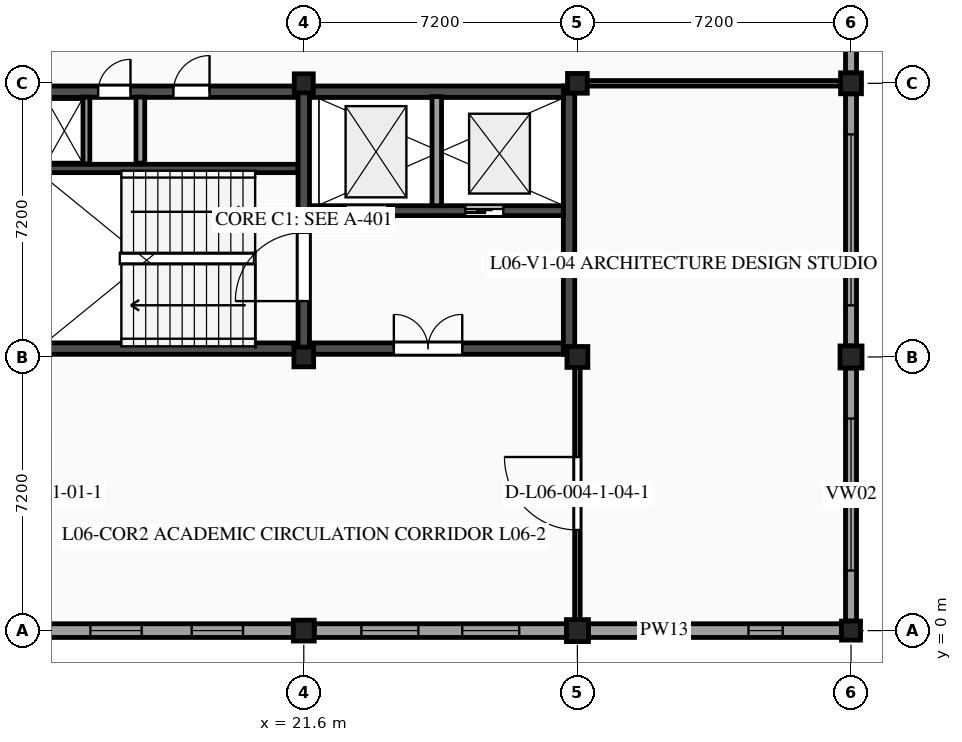
"""IFC4 building model, lengths in metres.
Left out: names, types, materials, properties, quantities, classifications, styles, units other than length and angle.
Written with IfcOpenShell. Run it as: python <this file> out.ifc"""

import sys

from ifc_helpers import new_model, si_unit, direction, frame, frame_2d, origin, origin_2d, place, context, subcontext, project, spatial, rectangle, extrude, element, fill, save


model = new_model("IFC4")
c1 = context("Model", 3, precision=1e-05, world=origin(), true_north=direction((0.0, 1.0)))
c2 = subcontext(c1, "Body", "Model", "MODEL_VIEW")
j1 = project(units=[si_unit("LENGTHUNIT", "METRE"), si_unit("PLANEANGLEUNIT", "RADIAN")], contexts=[c1])
p1 = place(None, origin())
s1 = spatial("IfcSite", under=j1, at=p1, CompositionType="ELEMENT")
p2 = place(p1, origin())
s2 = spatial("IfcBuilding", under=s1, at=p2, CompositionType="ELEMENT")
p3 = place(p2, frame((0.0, 0.0, 26.7)))
s3 = spatial("IfcBuildingStorey", under=s2, at=p3, CompositionType="ELEMENT", Elevation=26.7)
p4 = place(p3, frame((21.6, 0.0, 0.0), z_axis=(0.0, 0.0, 1.0), x_axis=(1.0, 0.0, 0.0)))
e1 = element("IfcColumn", 1, at=p4, inside=s3, PredefinedType="COLUMN", context=c2, shape_type="SweptSolid", body=[
    extrude(rectangle(XDim=0.55, YDim=0.55, at=origin_2d()), origin(), (0.0, 0.0, 1.0), 3.9),
])
p5 = place(p3, frame((21.6, 7.2, 0.0), z_axis=(0.0, 0.0, 1.0), x_axis=(1.0, 0.0, 0.0)))
e2 = element("IfcColumn", 2, at=p5, inside=s3, PredefinedType="COLUMN", context=c2, shape_type="SweptSolid", body=[
    extrude(rectangle(XDim=0.52, YDim=0.52, at=origin_2d()), origin(), (0.0, 0.0, 1.0), 3.9),
])
p6 = place(p3, frame((21.6, 14.4, 0.0), z_axis=(0.0, 0.0, 1.0), x_axis=(1.0, 0.0, 0.0)))
e3 = element("IfcColumn", 3, at=p6, inside=s3, PredefinedType="COLUMN", context=c2, shape_type="SweptSolid", body=[
    extrude(rectangle(XDim=0.5, YDim=0.5, at=origin_2d()), origin(), (0.0, 0.0, 1.0), 3.9),
])
p7 = place(p3, frame((28.8, 0.0, 0.0), z_axis=(0.0, 0.0, 1.0), x_axis=(1.0, 0.0, 0.0)))
e4 = element("IfcColumn", 4, at=p7, inside=s3, PredefinedType="COLUMN", context=c2, shape_type="SweptSolid", body=[
    extrude(rectangle(XDim=0.58, YDim=0.58, at=origin_2d()), origin(), (0.0, 0.0, 1.0), 3.9),
])
p8 = place(p3, frame((28.8, 7.2, 0.0), z_axis=(0.0, 0.0, 1.0), x_axis=(1.0, 0.0, 0.0)))
e5 = element("IfcColumn", 5, at=p8, inside=s3, PredefinedType="COLUMN", context=c2, shape_type="SweptSolid", body=[
    extrude(rectangle(XDim=0.55, YDim=0.55, at=origin_2d()), origin(), (0.0, 0.0, 1.0), 3.9),
])
p9 = place(p3, frame((28.8, 14.4, 0.0), z_axis=(0.0, 0.0, 1.0), x_axis=(1.0, 0.0, 0.0)))
e6 = element("IfcColumn", 6, at=p9, inside=s3, PredefinedType="COLUMN", context=c2, shape_type="SweptSolid", body=[
    extrude(rectangle(XDim=0.52, YDim=0.52, at=origin_2d()), origin(), (0.0, 0.0, 1.0), 3.9),
])
p10 = place(p3, frame((36.0, 0.0, 0.0), z_axis=(0.0, 0.0, 1.0), x_axis=(1.0, 0.0, 0.0)))
e7 = element("IfcColumn", 7, at=p10, inside=s3, PredefinedType="COLUMN", context=c2, shape_type="SweptSolid", body=[
    extrude(rectangle(XDim=0.5, YDim=0.5, at=origin_2d()), origin(), (0.0, 0.0, 1.0), 3.9),
])
p11 = place(p3, frame((36.0, 7.2, 0.0), z_axis=(0.0, 0.0, 1.0), x_axis=(1.0, 0.0, 0.0)))
e8 = element("IfcColumn", 8, at=p11, inside=s3, PredefinedType="COLUMN", context=c2, shape_type="SweptSolid", body=[
    extrude(rectangle(XDim=0.58, YDim=0.58, at=origin_2d()), origin(), (0.0, 0.0, 1.0), 3.9),
])
p12 = place(p3, frame((36.0, 14.4, 0.0), z_axis=(0.0, 0.0, 1.0), x_axis=(1.0, 0.0, 0.0)))
e9 = element("IfcColumn", 9, at=p12, inside=s3, PredefinedType="COLUMN", context=c2, shape_type="SweptSolid", body=[
    extrude(rectangle(XDim=0.55, YDim=0.55, at=origin_2d()), origin(), (0.0, 0.0, 1.0), 3.9),
])
p13 = place(p3, frame((36.0, 21.34, 0.0), z_axis=(0.0, 0.0, 1.0), x_axis=(0.0, -1.0, 0.0)))
e10 = element("IfcWall", 10, at=p13, inside=s3, PredefinedType="STANDARD", context=c2, shape_type="SweptSolid", body=[
    extrude(rectangle(XDim=6.665, YDim=0.29, at=frame_2d((3.333, 0.0))), origin(), (0.0, 0.0, 1.0), 2.83),
])
p14 = place(p13, frame((1.532, 0.0, 0.98)))
e11 = element("IfcOpeningElement", 11, at=p14, cuts=e10, PredefinedType="OPENING", context=c2, shape_type="SweptSolid", body=[
    extrude(rectangle(XDim=3.6, YDim=1.8, at=frame_2d((1.8, 0.9))), frame((0.0, 0.155, 0.0), z_axis=(0.0, -1.0, 0.0), x_axis=(1.0, 0.0, 0.0)), (0.0, 0.0, 1.0), 0.31),
])
p15 = place(p3, frame((36.0, 14.125, 0.0), z_axis=(0.0, 0.0, 1.0), x_axis=(0.0, -1.0, 0.0)))
e12 = element("IfcWall", 12, at=p15, inside=s3, PredefinedType="STANDARD", context=c2, shape_type="SweptSolid", body=[
    extrude(rectangle(XDim=6.635, YDim=0.29, at=frame_2d((3.317, 0.0))), origin(), (0.0, 0.0, 1.0), 2.83),
])
p16 = place(p15, frame((1.067, 0.0, 0.98)))
e13 = element("IfcOpeningElement", 13, at=p16, cuts=e12, PredefinedType="OPENING", context=c2, shape_type="SweptSolid", body=[
    extrude(rectangle(XDim=4.5, YDim=1.55, at=frame_2d((2.25, 0.775))), frame((0.0, 0.155, 0.0), z_axis=(0.0, -1.0, 0.0), x_axis=(1.0, 0.0, 0.0)), (0.0, 0.0, 1.0), 0.31),
])
p17 = place(p3, frame((36.0, 6.91, 0.0), z_axis=(0.0, 0.0, 1.0), x_axis=(0.0, -1.0, 0.0)))
e14 = element("IfcWall", 14, at=p17, inside=s3, PredefinedType="STANDARD", context=c2, shape_type="SweptSolid", body=[
    extrude(rectangle(XDim=6.66, YDim=0.29, at=frame_2d((3.33, 0.0))), origin(), (0.0, 0.0, 1.0), 2.83),
])
p18 = place(p17, frame((1.33, 0.0, 0.98)))
e15 = element("IfcOpeningElement", 15, at=p18, cuts=e14, PredefinedType="OPENING", context=c2, shape_type="SweptSolid", body=[
    extrude(rectangle(XDim=4.0, YDim=1.55, at=frame_2d((2.0, 0.775))), frame((0.0, 0.155, 0.0), z_axis=(0.0, -1.0, 0.0), x_axis=(1.0, 0.0, 0.0)), (0.0, 0.0, 1.0), 0.31),
])
p19 = place(p3, frame((35.75, 0.0, 0.0), z_axis=(0.0, 0.0, 1.0), x_axis=(-1.0, 0.0, 0.0)))
e16 = element("IfcWall", 16, at=p19, inside=s3, PredefinedType="STANDARD", context=c2, shape_type="SweptSolid", body=[
    extrude(rectangle(XDim=6.66, YDim=0.36, at=frame_2d((3.33, 0.0))), origin(), (0.0, 0.0, 1.0), 2.83),
])
p20 = place(p19, frame((1.548, 0.0, 1.15)))
e17 = element("IfcOpeningElement", 17, at=p20, cuts=e16, PredefinedType="OPENING", context=c2, shape_type="SweptSolid", body=[
    extrude(rectangle(XDim=0.9, YDim=1.3, at=frame_2d((0.45, 0.65))), frame((0.0, 0.19, 0.0), z_axis=(0.0, -1.0, 0.0), x_axis=(1.0, 0.0, 0.0)), (0.0, 0.0, 1.0), 0.38),
])
p21 = place(p19, frame((4.212, 0.0, 1.15)))
e18 = element("IfcOpeningElement", 18, at=p21, cuts=e16, PredefinedType="OPENING", context=c2, shape_type="SweptSolid", body=[
    extrude(rectangle(XDim=0.9, YDim=1.3, at=frame_2d((0.45, 0.65))), frame((0.0, 0.19, 0.0), z_axis=(0.0, -1.0, 0.0), x_axis=(1.0, 0.0, 0.0)), (0.0, 0.0, 1.0), 0.38),
])
p22 = place(p3, frame((28.51, 0.0, 0.0), z_axis=(0.0, 0.0, 1.0), x_axis=(-1.0, 0.0, 0.0)))
e19 = element("IfcWall", 19, at=p22, inside=s3, PredefinedType="STANDARD", context=c2, shape_type="SweptSolid", body=[
    extrude(rectangle(XDim=6.635, YDim=0.36, at=frame_2d((3.317, 0.0))), origin(), (0.0, 0.0, 1.0), 2.865),
])
p23 = place(p22, frame((1.24, 0.0, 1.15)))
e20 = element("IfcOpeningElement", 20, at=p23, cuts=e19, PredefinedType="OPENING", context=c2, shape_type="SweptSolid", body=[
    extrude(rectangle(XDim=1.5, YDim=1.2, at=frame_2d((0.75, 0.6))), frame((0.0, 0.19, 0.0), z_axis=(0.0, -1.0, 0.0), x_axis=(1.0, 0.0, 0.0)), (0.0, 0.0, 1.0), 0.38),
])
p24 = place(p22, frame((3.895, 0.0, 1.15)))
e21 = element("IfcOpeningElement", 21, at=p24, cuts=e19, PredefinedType="OPENING", context=c2, shape_type="SweptSolid", body=[
    extrude(rectangle(XDim=1.5, YDim=1.2, at=frame_2d((0.75, 0.6))), frame((0.0, 0.19, 0.0), z_axis=(0.0, -1.0, 0.0), x_axis=(1.0, 0.0, 0.0)), (0.0, 0.0, 1.0), 0.38),
])
p25 = place(p3, frame((21.325, 0.0, 0.0), z_axis=(0.0, 0.0, 1.0), x_axis=(-1.0, 0.0, 0.0)))
e22 = element("IfcWall", 22, at=p25, inside=s3, PredefinedType="STANDARD", context=c2, shape_type="SweptSolid", body=[
    extrude(rectangle(XDim=6.665, YDim=0.36, at=frame_2d((3.333, 0.0))), origin(), (0.0, 0.0, 1.0), 2.865),
])
p26 = place(p25, frame((1.324, 0.0, 1.15)))
e23 = element("IfcOpeningElement", 23, at=p26, cuts=e22, PredefinedType="OPENING", context=c2, shape_type="SweptSolid", body=[
    extrude(rectangle(XDim=1.35, YDim=1.1, at=frame_2d((0.675, 0.55))), frame((0.0, 0.19, 0.0), z_axis=(0.0, -1.0, 0.0), x_axis=(1.0, 0.0, 0.0)), (0.0, 0.0, 1.0), 0.38),
])
p27 = place(p25, frame((3.99, 0.0, 1.15)))
e24 = element("IfcOpeningElement", 24, at=p27, cuts=e22, PredefinedType="OPENING", context=c2, shape_type="SweptSolid", body=[
    extrude(rectangle(XDim=1.35, YDim=1.1, at=frame_2d((0.675, 0.55))), frame((0.0, 0.19, 0.0), z_axis=(0.0, -1.0, 0.0), x_axis=(1.0, 0.0, 0.0)), (0.0, 0.0, 1.0), 0.38),
])
p28 = place(p3, frame((14.77, 7.42, 0.0), z_axis=(0.0, 0.0, 1.0), x_axis=(1.0, 0.0, 0.0)))
e25 = element("IfcWall", 25, at=p28, inside=s3, PredefinedType="SHEAR", context=c2, shape_type="SweptSolid", body=[
    extrude(rectangle(XDim=6.68, YDim=0.3, at=frame_2d((3.34, 0.0))), origin(), (0.0, 0.0, 1.0), 3.67),
])
p29 = place(p3, frame((14.77, 14.18, 0.0), z_axis=(0.0, 0.0, 1.0), x_axis=(1.0, 0.0, 0.0)))
e26 = element("IfcWall", 26, at=p29, inside=s3, PredefinedType="SHEAR", context=c2, shape_type="SweptSolid", body=[
    extrude(rectangle(XDim=6.68, YDim=0.3, at=frame_2d((3.34, 0.0))), origin(), (0.0, 0.0, 1.0), 3.67),
])
p30 = place(p29, frame((1.42, 0.0, 0.0)))
e27 = element("IfcOpeningElement", 27, at=p30, cuts=e26, PredefinedType="OPENING", context=c2, shape_type="SweptSolid", body=[
    extrude(rectangle(XDim=0.85, YDim=2.1, at=frame_2d((0.425, 1.05))), frame((0.0, 0.16, 0.0), z_axis=(0.0, -1.0, 0.0), x_axis=(1.0, 0.0, 0.0)), (0.0, 0.0, 1.0), 0.32),
])
p31 = place(p29, frame((3.4, 0.0, 0.0)))
e28 = element("IfcOpeningElement", 28, at=p31, cuts=e26, PredefinedType="OPENING", context=c2, shape_type="SweptSolid", body=[
    extrude(rectangle(XDim=0.95, YDim=2.15, at=frame_2d((0.475, 1.075))), frame((0.0, 0.16, 0.0), z_axis=(0.0, -1.0, 0.0), x_axis=(1.0, 0.0, 0.0)), (0.0, 0.0, 1.0), 0.32),
])
p32 = place(p3, frame((14.77, 12.16, 0.0), z_axis=(0.0, 0.0, 1.0), x_axis=(1.0, 0.0, 0.0)))
e29 = element("IfcWall", 29, at=p32, inside=s3, PredefinedType="SHEAR", context=c2, shape_type="SweptSolid", body=[
    extrude(rectangle(XDim=6.68, YDim=0.22, at=frame_2d((3.34, 0.0))), origin(), (0.0, 0.0, 1.0), 3.67),
])
p33 = place(p3, frame((17.3, 12.3, 0.0), z_axis=(0.0, 0.0, 1.0), x_axis=(0.0, 1.0, 0.0)))
e30 = element("IfcWall", 30, at=p33, inside=s3, PredefinedType="PARTITIONING", context=c2, shape_type="SweptSolid", body=[
    extrude(rectangle(XDim=1.74, YDim=0.23, at=frame_2d((0.87, 0.0))), origin(), (0.0, 0.0, 1.0), 3.67),
])
p34 = place(p3, frame((15.88, 12.28, 0.0), z_axis=(0.0, 0.0, 1.0), x_axis=(0.0, 1.0, 0.0)))
e31 = element("IfcWall", 31, at=p34, inside=s3, PredefinedType="PARTITIONING", context=c2, shape_type="SweptSolid", body=[
    extrude(rectangle(XDim=1.76, YDim=0.18, at=frame_2d((0.88, 0.0))), origin(), (0.0, 0.0, 1.0), 3.67),
])
p35 = place(p3, frame((21.6, 7.27, 0.0), z_axis=(0.0, 0.0, 1.0), x_axis=(0.0, 1.0, 0.0)))
e32 = element("IfcWall", 32, at=p35, inside=s3, PredefinedType="SHEAR", context=c2, shape_type="SweptSolid", body=[
    extrude(rectangle(XDim=7.06, YDim=0.3, at=frame_2d((3.53, 0.0))), origin(), (0.0, 0.0, 1.0), 3.67),
])
p36 = place(p35, frame((1.4, 0.0, 0.0)))
e33 = element("IfcOpeningElement", 33, at=p36, cuts=e32, PredefinedType="OPENING", context=c2, shape_type="SweptSolid", body=[
    extrude(rectangle(XDim=1.8, YDim=2.2, at=frame_2d((0.9, 1.1))), frame((0.0, 0.16, 0.0), z_axis=(0.0, -1.0, 0.0), x_axis=(1.0, 0.0, 0.0)), (0.0, 0.0, 1.0), 0.32),
])
p37 = place(p3, frame((21.75, 7.42, 0.0), z_axis=(0.0, 0.0, 1.0), x_axis=(1.0, 0.0, 0.0)))
e34 = element("IfcWall", 34, at=p37, inside=s3, PredefinedType="SHEAR", context=c2, shape_type="SweptSolid", body=[
    extrude(rectangle(XDim=6.68, YDim=0.3, at=frame_2d((3.34, 0.0))), origin(), (0.0, 0.0, 1.0), 3.67),
])
p38 = place(p37, frame((2.22, 0.0, 0.0)))
e35 = element("IfcOpeningElement", 35, at=p38, cuts=e34, PredefinedType="OPENING", context=c2, shape_type="SweptSolid", body=[
    extrude(rectangle(XDim=1.8, YDim=2.2, at=frame_2d((0.9, 1.1))), frame((0.0, 0.16, 0.0), z_axis=(0.0, -1.0, 0.0), x_axis=(1.0, 0.0, 0.0)), (0.0, 0.0, 1.0), 0.32),
])
p39 = place(p3, frame((28.58, 7.27, 0.0), z_axis=(0.0, 0.0, 1.0), x_axis=(0.0, 1.0, 0.0)))
e36 = element("IfcWall", 36, at=p39, inside=s3, PredefinedType="SHEAR", context=c2, shape_type="SweptSolid", body=[
    extrude(rectangle(XDim=7.06, YDim=0.3, at=frame_2d((3.53, 0.0))), origin(), (0.0, 0.0, 1.0), 3.67),
])
p40 = place(p3, frame((21.75, 14.18, 0.0), z_axis=(0.0, 0.0, 1.0), x_axis=(1.0, 0.0, 0.0)))
e37 = element("IfcWall", 37, at=p40, inside=s3, PredefinedType="SHEAR", context=c2, shape_type="SweptSolid", body=[
    extrude(rectangle(XDim=6.68, YDim=0.3, at=frame_2d((3.34, 0.0))), origin(), (0.0, 0.0, 1.0), 3.67),
])
p41 = place(p3, frame((21.75, 11.05, 0.0), z_axis=(0.0, 0.0, 1.0), x_axis=(1.0, 0.0, 0.0)))
e38 = element("IfcWall", 38, at=p41, inside=s3, PredefinedType="SHEAR", context=c2, shape_type="SweptSolid", body=[
    extrude(rectangle(XDim=6.68, YDim=0.26, at=frame_2d((3.34, 0.0))), origin(), (0.0, 0.0, 1.0), 3.67),
])
p42 = place(p41, frame((0.95, 0.0, 0.0)))
e39 = element("IfcOpeningElement", 39, at=p42, cuts=e38, PredefinedType="OPENING", context=c2, shape_type="SweptSolid", body=[
    extrude(rectangle(XDim=1.1, YDim=2.2, at=frame_2d((0.55, 1.1))), frame((0.0, 0.14, 0.0), z_axis=(0.0, -1.0, 0.0), x_axis=(1.0, 0.0, 0.0)), (0.0, 0.0, 1.0), 0.28),
])
p43 = place(p41, frame((4.1, 0.0, 0.0)))
e40 = element("IfcOpeningElement", 40, at=p43, cuts=e38, PredefinedType="OPENING", context=c2, shape_type="SweptSolid", body=[
    extrude(rectangle(XDim=1.0, YDim=2.15, at=frame_2d((0.5, 1.075))), frame((0.0, 0.14, 0.0), z_axis=(0.0, -1.0, 0.0), x_axis=(1.0, 0.0, 0.0)), (0.0, 0.0, 1.0), 0.28),
])
p44 = place(p3, frame((25.1, 11.18, 0.0), z_axis=(0.0, 0.0, 1.0), x_axis=(0.0, 1.0, 0.0)))
e41 = element("IfcWall", 41, at=p44, inside=s3, PredefinedType="PARTITIONING", context=c2, shape_type="SweptSolid", body=[
    extrude(rectangle(XDim=2.87, YDim=0.25, at=frame_2d((1.435, 0.0))), origin(), (0.0, 0.0, 1.0), 3.67),
])
p45 = place(p3, frame((28.8, 0.295, 0.0), z_axis=(0.0, 0.0, 1.0), x_axis=(0.0, 1.0, 0.0)))
e42 = element("IfcWall", 42, at=p45, inside=s3, PredefinedType="PARTITIONING", context=c2, shape_type="SweptSolid", body=[
    extrude(rectangle(XDim=6.625, YDim=0.145, at=frame_2d((3.312, 0.0))), origin(), (0.0, 0.0, 1.0), 3.005),
])
p46 = place(p45, frame((2.353, 0.0, 0.0)))
e43 = element("IfcOpeningElement", 43, at=p46, cuts=e42, PredefinedType="OPENING", context=c2, shape_type="SweptSolid", body=[
    extrude(rectangle(XDim=1.92, YDim=2.35, at=frame_2d((0.96, 1.175))), frame((0.0, 0.083, 0.0), z_axis=(0.0, -1.0, 0.0), x_axis=(1.0, 0.0, 0.0)), (0.0, 0.0, 1.0), 0.165),
])
p47 = place(p3, frame((29.065, 14.4, 0.0), z_axis=(0.0, 0.0, 1.0), x_axis=(1.0, 0.0, 0.0)))
e44 = element("IfcWall", 44, at=p47, inside=s3, PredefinedType="PARTITIONING", context=c2, shape_type="SweptSolid", body=[
    extrude(rectangle(XDim=6.655, YDim=0.145, at=frame_2d((3.328, 0.0))), origin(), (0.0, 0.0, 1.0), 2.855),
])
p48 = place(p16, origin())
e45 = element("IfcWindow", 45, at=p48, inside=s3, PartitioningType="SINGLE_PANEL", PredefinedType="WINDOW", context=c2, shape_type="SweptSolid", body=[
    extrude(rectangle(XDim=4.5, YDim=1.55, at=frame_2d((2.25, 0.775))), frame((0.0, -0.03, 0.0), z_axis=(0.0, -1.0, 0.0), x_axis=(1.0, 0.0, 0.0)), (0.0, 0.0, 1.0), 0.06),
])
fill(e13, e45)
p49 = place(p18, origin())
e46 = element("IfcWindow", 46, at=p49, inside=s3, PartitioningType="SINGLE_PANEL", PredefinedType="WINDOW", context=c2, shape_type="SweptSolid", body=[
    extrude(rectangle(XDim=4.0, YDim=1.55, at=frame_2d((2.0, 0.775))), frame((0.0, -0.03, 0.0), z_axis=(0.0, -1.0, 0.0), x_axis=(1.0, 0.0, 0.0)), (0.0, 0.0, 1.0), 0.06),
])
fill(e15, e46)
p50 = place(p20, origin())
e47 = element("IfcWindow", 47, at=p50, inside=s3, PartitioningType="SINGLE_PANEL", PredefinedType="WINDOW", context=c2, shape_type="SweptSolid", body=[
    extrude(rectangle(XDim=0.9, YDim=1.3, at=frame_2d((0.45, 0.65))), frame((0.0, -0.08, 0.0), z_axis=(0.0, -1.0, 0.0), x_axis=(1.0, 0.0, 0.0)), (0.0, 0.0, 1.0), 0.06),
])
fill(e17, e47)
p51 = place(p21, origin())
e48 = element("IfcWindow", 48, at=p51, inside=s3, PartitioningType="SINGLE_PANEL", PredefinedType="WINDOW", context=c2, shape_type="SweptSolid", body=[
    extrude(rectangle(XDim=0.9, YDim=1.3, at=frame_2d((0.45, 0.65))), frame((0.0, -0.08, 0.0), z_axis=(0.0, -1.0, 0.0), x_axis=(1.0, 0.0, 0.0)), (0.0, 0.0, 1.0), 0.06),
])
fill(e18, e48)
p52 = place(p23, origin())
e49 = element("IfcWindow", 49, at=p52, inside=s3, PartitioningType="SINGLE_PANEL", PredefinedType="WINDOW", context=c2, shape_type="SweptSolid", body=[
    extrude(rectangle(XDim=1.5, YDim=1.2, at=frame_2d((0.75, 0.6))), frame((0.0, -0.08, 0.0), z_axis=(0.0, -1.0, 0.0), x_axis=(1.0, 0.0, 0.0)), (0.0, 0.0, 1.0), 0.06),
])
fill(e20, e49)
p53 = place(p24, origin())
e50 = element("IfcWindow", 50, at=p53, inside=s3, PartitioningType="SINGLE_PANEL", PredefinedType="WINDOW", context=c2, shape_type="SweptSolid", body=[
    extrude(rectangle(XDim=1.5, YDim=1.2, at=frame_2d((0.75, 0.6))), frame((0.0, -0.08, 0.0), z_axis=(0.0, -1.0, 0.0), x_axis=(1.0, 0.0, 0.0)), (0.0, 0.0, 1.0), 0.06),
])
fill(e21, e50)
p54 = place(p26, origin())
e51 = element("IfcWindow", 51, at=p54, inside=s3, PartitioningType="SINGLE_PANEL", PredefinedType="WINDOW", context=c2, shape_type="SweptSolid", body=[
    extrude(rectangle(XDim=1.35, YDim=1.1, at=frame_2d((0.675, 0.55))), frame((0.0, -0.08, 0.0), z_axis=(0.0, -1.0, 0.0), x_axis=(1.0, 0.0, 0.0)), (0.0, 0.0, 1.0), 0.06),
])
fill(e23, e51)
p55 = place(p27, origin())
e52 = element("IfcWindow", 52, at=p55, inside=s3, PartitioningType="SINGLE_PANEL", PredefinedType="WINDOW", context=c2, shape_type="SweptSolid", body=[
    extrude(rectangle(XDim=1.35, YDim=1.1, at=frame_2d((0.675, 0.55))), frame((0.0, -0.08, 0.0), z_axis=(0.0, -1.0, 0.0), x_axis=(1.0, 0.0, 0.0)), (0.0, 0.0, 1.0), 0.06),
])
fill(e24, e52)
p56 = place(p30, origin())
e53 = element("IfcDoor", 53, at=p56, inside=s3, OperationType="SINGLE_SWING_RIGHT", PredefinedType="DOOR", context=c2, shape_type="SweptSolid", body=[
    extrude(rectangle(XDim=0.85, YDim=2.1, at=frame_2d((0.425, 1.05))), frame((0.0, 0.025, 0.0), z_axis=(0.0, -1.0, 0.0), x_axis=(1.0, 0.0, 0.0)), (0.0, 0.0, 1.0), 0.05),
])
fill(e27, e53)
p57 = place(p36, origin())
e54 = element("IfcDoor", 54, at=p57, inside=s3, OperationType="SINGLE_SWING_LEFT", PredefinedType="DOOR", context=c2, shape_type="SweptSolid", body=[
    extrude(rectangle(XDim=1.8, YDim=2.2, at=frame_2d((0.9, 1.1))), frame((0.0, 0.025, 0.0), z_axis=(0.0, -1.0, 0.0), x_axis=(1.0, 0.0, 0.0)), (0.0, 0.0, 1.0), 0.05),
])
fill(e33, e54)
p58 = place(p31, origin())
e55 = element("IfcDoor", 55, at=p58, inside=s3, OperationType="SINGLE_SWING_RIGHT", PredefinedType="DOOR", context=c2, shape_type="SweptSolid", body=[
    extrude(rectangle(XDim=0.95, YDim=2.15, at=frame_2d((0.475, 1.075))), frame((0.0, 0.025, 0.0), z_axis=(0.0, -1.0, 0.0), x_axis=(1.0, 0.0, 0.0)), (0.0, 0.0, 1.0), 0.05),
])
fill(e28, e55)
p59 = place(p42, origin())
e56 = element("IfcDoor", 56, at=p59, inside=s3, OperationType="SLIDING_TO_LEFT", PredefinedType="DOOR", context=c2, shape_type="SweptSolid", body=[
    extrude(rectangle(XDim=1.1, YDim=2.2, at=frame_2d((0.55, 1.1))), frame((0.0, 0.025, 0.0), z_axis=(0.0, -1.0, 0.0), x_axis=(1.0, 0.0, 0.0)), (0.0, 0.0, 1.0), 0.05),
])
fill(e39, e56)
p60 = place(p43, origin())
e57 = element("IfcDoor", 57, at=p60, inside=s3, OperationType="SLIDING_TO_RIGHT", PredefinedType="DOOR", context=c2, shape_type="SweptSolid", body=[
    extrude(rectangle(XDim=1.0, YDim=2.15, at=frame_2d((0.5, 1.075))), frame((0.0, 0.025, 0.0), z_axis=(0.0, -1.0, 0.0), x_axis=(1.0, 0.0, 0.0)), (0.0, 0.0, 1.0), 0.05),
])
fill(e40, e57)
p61 = place(p38, origin())
e58 = element("IfcDoor", 58, at=p61, inside=s3, OperationType="DOUBLE_DOOR_SINGLE_SWING", PredefinedType="DOOR", context=c2, shape_type="SweptSolid", body=[
    extrude(rectangle(XDim=1.8, YDim=2.2, at=frame_2d((0.9, 1.1))), frame((0.0, 0.025, 0.0), z_axis=(0.0, -1.0, 0.0), x_axis=(1.0, 0.0, 0.0)), (0.0, 0.0, 1.0), 0.05),
])
fill(e35, e58)
p62 = place(p46, origin())
e59 = element("IfcDoor", 59, at=p62, inside=s3, OperationType="SINGLE_SWING_RIGHT", PredefinedType="DOOR", context=c2, shape_type="SweptSolid", body=[
    extrude(rectangle(XDim=1.92, YDim=2.35, at=frame_2d((0.96, 1.175))), frame((0.0, 0.025, 0.0), z_axis=(0.0, -1.0, 0.0), x_axis=(1.0, 0.0, 0.0)), (0.0, 0.0, 1.0), 0.05),
])
fill(e43, e59)
save(model, sys.argv[1])
